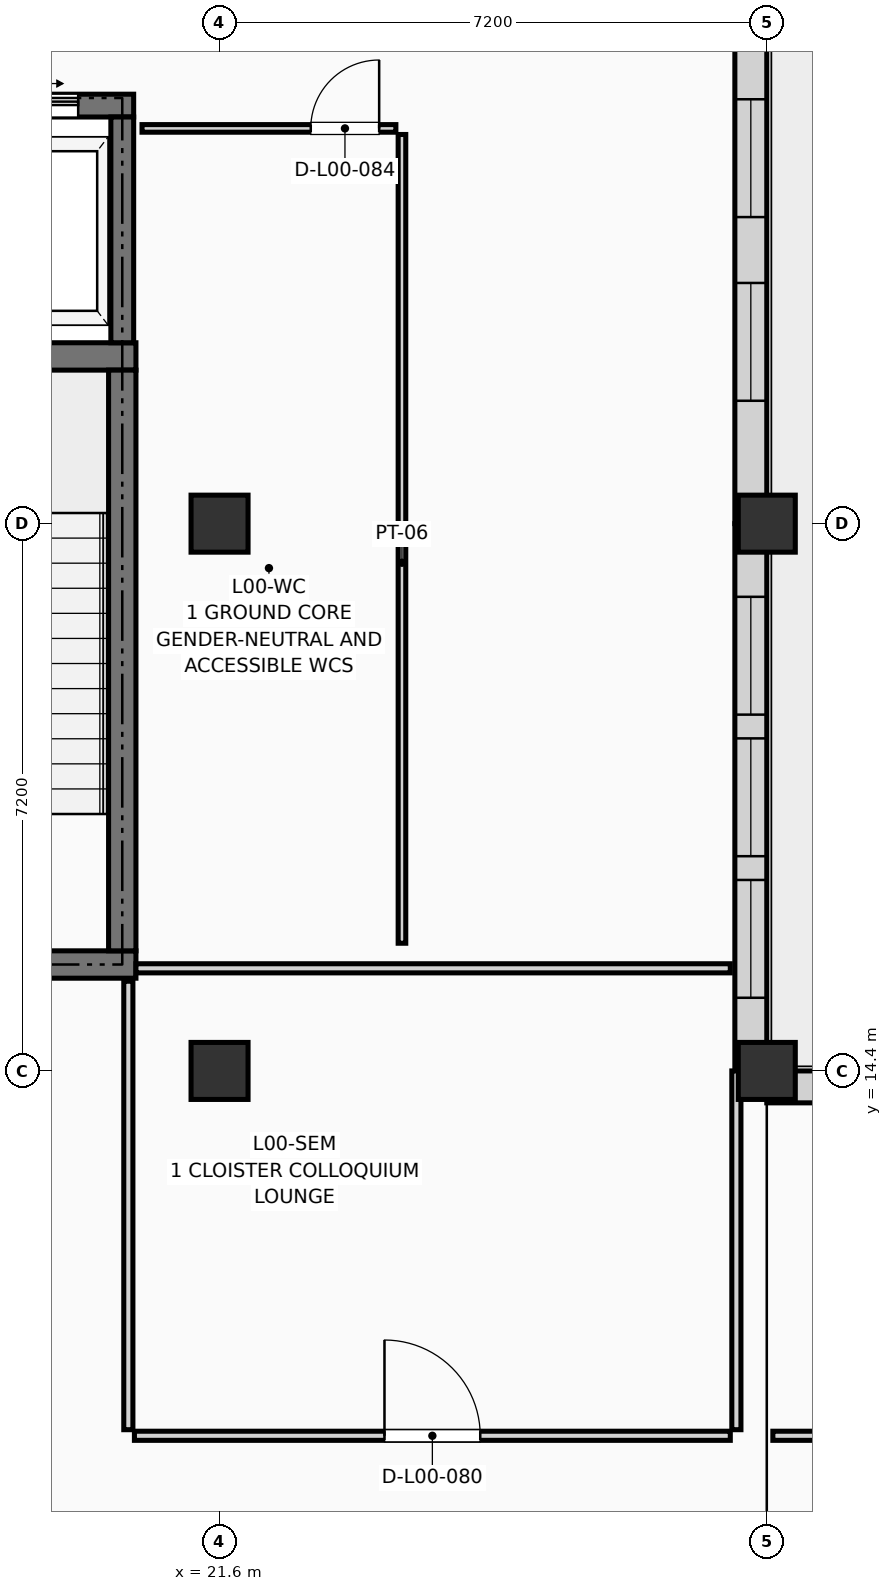
"""IFC4 building model, lengths in metres.
Left out: names, types, materials, properties, quantities, classifications, styles, units other than length and angle.
Written with IfcOpenShell. Run it as: python <this file> out.ifc"""

import sys

from ifc_helpers import new_model, si_unit, direction, frame, frame_2d, origin, origin_2d, place, context, subcontext, project, spatial, rectangle, extrude, element, fill, save


model = new_model("IFC4")
c1 = context("Model", 3, precision=1e-05, world=origin(), true_north=direction((0.0, 1.0)))
c2 = subcontext(c1, "Body", "Model", "MODEL_VIEW")
j1 = project(units=[si_unit("LENGTHUNIT", "METRE"), si_unit("PLANEANGLEUNIT", "RADIAN")], contexts=[c1])
p1 = place(None, origin())
s1 = spatial("IfcSite", under=j1, at=p1, CompositionType="ELEMENT")
p2 = place(p1, origin())
s2 = spatial("IfcBuilding", under=s1, at=p2, CompositionType="ELEMENT")
p3 = place(p2, origin())
s3 = spatial("IfcBuildingStorey", under=s2, at=p3, CompositionType="ELEMENT", Elevation=0.0)
for number, where, z_axis, x_axis in (
    (1, (21.6, 14.4, 0.0), (0.0, 0.0, 1.0), (1.0, 0.0, 0.0)),
    (2, (21.6, 21.6, 0.0), (0.0, 0.0, 1.0), (1.0, 0.0, 0.0)),
    (3, (28.8, 14.4, 0.0), (0.0, 0.0, 1.0), (1.0, 0.0, 0.0)),
    (4, (28.8, 21.6, 0.0), (0.0, 0.0, 1.0), (1.0, 0.0, 0.0)),
):
    element("IfcColumn", number, at=place(p3, frame(where, z_axis=z_axis, x_axis=x_axis)), inside=s3, PredefinedType="COLUMN", context=c2, shape_type="SweptSolid", body=[
        extrude(rectangle(XDim=0.75, YDim=0.75, at=origin_2d()), origin(), (0.0, 0.0, 1.0), 4.5),
    ])
p4 = place(p3, frame((28.59, 21.6, 0.0), z_axis=(0.0, 0.0, 1.0), x_axis=(0.0, 1.0, 0.0)))
e5 = element("IfcWall", 5, at=p4, inside=s3, PredefinedType="SOLIDWALL", context=c2, shape_type="SweptSolid", body=[
    extrude(rectangle(XDim=7.2, YDim=0.42, at=frame_2d((3.6, 0.0))), origin(), (0.0, 0.0, 1.0), 3.62),
])
p5 = place(p4, frame((1.617, 0.0, 0.45)))
e6 = element("IfcOpeningElement", 6, at=p5, cuts=e5, PredefinedType="OPENING", context=c2, shape_type="SweptSolid", body=[
    extrude(rectangle(XDim=1.55, YDim=2.55, at=frame_2d((0.775, 1.275))), frame((0.0, 0.222, 0.0), z_axis=(0.0, -1.0, 0.0), x_axis=(1.0, 0.0, 0.0)), (0.0, 0.0, 1.0), 0.444),
])
p6 = place(p4, frame((4.033, 0.0, 0.45)))
e7 = element("IfcOpeningElement", 7, at=p6, cuts=e5, PredefinedType="OPENING", context=c2, shape_type="SweptSolid", body=[
    extrude(rectangle(XDim=1.55, YDim=2.55, at=frame_2d((0.775, 1.275))), frame((0.0, 0.222, 0.0), z_axis=(0.0, -1.0, 0.0), x_axis=(1.0, 0.0, 0.0)), (0.0, 0.0, 1.0), 0.444),
])
p7 = place(p3, frame((28.59, 14.4, 0.0), z_axis=(0.0, 0.0, 1.0), x_axis=(0.0, 1.0, 0.0)))
e8 = element("IfcWall", 8, at=p7, inside=s3, PredefinedType="SOLIDWALL", context=c2, shape_type="SweptSolid", body=[
    extrude(rectangle(XDim=7.2, YDim=0.42, at=frame_2d((3.6, 0.0))), origin(), (0.0, 0.0, 1.0), 3.62),
])
p8 = place(p7, frame((0.962, 0.0, 0.18)))
e9 = element("IfcOpeningElement", 9, at=p8, cuts=e8, PredefinedType="OPENING", context=c2, shape_type="SweptSolid", body=[
    extrude(rectangle(XDim=1.55, YDim=3.25, at=frame_2d((0.775, 1.625))), frame((0.0, 0.222, 0.0), z_axis=(0.0, -1.0, 0.0), x_axis=(1.0, 0.0, 0.0)), (0.0, 0.0, 1.0), 0.444),
])
p9 = place(p7, frame((2.825, 0.0, 0.18)))
e10 = element("IfcOpeningElement", 10, at=p9, cuts=e8, PredefinedType="OPENING", context=c2, shape_type="SweptSolid", body=[
    extrude(rectangle(XDim=1.55, YDim=3.25, at=frame_2d((0.775, 1.625))), frame((0.0, 0.222, 0.0), z_axis=(0.0, -1.0, 0.0), x_axis=(1.0, 0.0, 0.0)), (0.0, 0.0, 1.0), 0.444),
])
p10 = place(p7, frame((4.688, 0.0, 0.18)))
e11 = element("IfcOpeningElement", 11, at=p10, cuts=e8, PredefinedType="OPENING", context=c2, shape_type="SweptSolid", body=[
    extrude(rectangle(XDim=1.55, YDim=3.25, at=frame_2d((0.775, 1.625))), frame((0.0, 0.222, 0.0), z_axis=(0.0, -1.0, 0.0), x_axis=(1.0, 0.0, 0.0)), (0.0, 0.0, 1.0), 0.444),
])
p11 = place(p3, frame((28.8, 14.19, 0.0), z_axis=(0.0, 0.0, 1.0), x_axis=(1.0, 0.0, 0.0)))
e12 = element("IfcWall", 12, at=p11, inside=s3, PredefinedType="SOLIDWALL", context=c2, shape_type="SweptSolid", body=[
    extrude(rectangle(XDim=7.2, YDim=0.42, at=frame_2d((3.6, 0.0))), origin(), (0.0, 0.0, 1.0), 3.62),
])
p12 = place(p11, frame((1.75, 0.0, 0.45)))
e13 = element("IfcOpeningElement", 13, at=p12, cuts=e12, PredefinedType="OPENING", context=c2, shape_type="SweptSolid", body=[
    extrude(rectangle(XDim=1.35, YDim=2.45, at=frame_2d((0.675, 1.225))), frame((0.0, 0.222, 0.0), z_axis=(0.0, -1.0, 0.0), x_axis=(1.0, 0.0, 0.0)), (0.0, 0.0, 1.0), 0.444),
])
p13 = place(p11, frame((4.1, 0.0, 0.45)))
e14 = element("IfcOpeningElement", 14, at=p13, cuts=e12, PredefinedType="OPENING", context=c2, shape_type="SweptSolid", body=[
    extrude(rectangle(XDim=1.35, YDim=2.45, at=frame_2d((0.675, 1.225))), frame((0.0, 0.222, 0.0), z_axis=(0.0, -1.0, 0.0), x_axis=(1.0, 0.0, 0.0)), (0.0, 0.0, 1.0), 0.444),
])
for number, where, z_axis, x_axis in (
    (15, (15.62, 15.8, 0.0), (0.0, 0.0, 1.0), (1.0, 0.0, 0.0)),
    (16, (15.62, 23.8, 0.0), (0.0, 0.0, 1.0), (1.0, 0.0, 0.0)),
):
    element("IfcWall", number, at=place(p3, frame(where, z_axis=z_axis, x_axis=x_axis)), inside=s3, PredefinedType="SHEAR", context=c2, shape_type="SweptSolid", body=[
        extrude(rectangle(XDim=4.88, YDim=0.36, at=frame_2d((2.44, 0.0))), origin(), (0.0, 0.0, 1.0), 4.25),
    ])
p14 = place(p3, frame((20.32, 15.98, 0.0), z_axis=(0.0, 0.0, 1.0), x_axis=(0.0, 1.0, 0.0)))
e17 = element("IfcWall", 17, at=p14, inside=s3, PredefinedType="SHEAR", context=c2, shape_type="SweptSolid", body=[
    extrude(rectangle(XDim=7.64, YDim=0.36, at=frame_2d((3.82, 0.0))), origin(), (0.0, 0.0, 1.0), 4.25),
])
p15 = place(p3, frame((17.91, 27.1, 0.0), z_axis=(0.0, 0.0, 1.0), x_axis=(1.0, 0.0, 0.0)))
e18 = element("IfcWall", 18, at=p15, inside=s3, PredefinedType="SHEAR", context=c2, shape_type="SweptSolid", body=[
    extrude(rectangle(XDim=2.56, YDim=0.3, at=frame_2d((1.28, 0.0))), origin(), (0.0, 0.0, 1.0), 4.25),
])
p16 = place(p15, frame((0.73, 0.0, 0.0)))
e19 = element("IfcOpeningElement", 19, at=p16, cuts=e18, PredefinedType="OPENING", context=c2, shape_type="SweptSolid", body=[
    extrude(rectangle(XDim=1.1, YDim=2.2, at=frame_2d((0.55, 1.1))), frame((0.0, 0.162, 0.0), z_axis=(0.0, -1.0, 0.0), x_axis=(1.0, 0.0, 0.0)), (0.0, 0.0, 1.0), 0.324),
])
p17 = place(p3, frame((20.32, 23.98, 0.0), z_axis=(0.0, 0.0, 1.0), x_axis=(0.0, 1.0, 0.0)))
e20 = element("IfcWall", 20, at=p17, inside=s3, PredefinedType="SHEAR", context=c2, shape_type="SweptSolid", body=[
    extrude(rectangle(XDim=2.97, YDim=0.3, at=frame_2d((1.485, 0.0))), origin(), (0.0, 0.0, 1.0), 4.25),
])
p18 = place(p3, frame((20.4, 9.68, 0.0), z_axis=(0.0, 0.0, 1.0), x_axis=(0.0, 1.0, 0.0)))
e21 = element("IfcWall", 21, at=p18, inside=s3, PredefinedType="PARTITIONING", context=c2, shape_type="SweptSolid", body=[
    extrude(rectangle(XDim=5.9, YDim=0.12, at=frame_2d((2.95, 0.0))), origin(), (0.0, 0.0, 1.0), 4.235),
])
p19 = place(p3, frame((20.48, 9.6, 0.0), z_axis=(0.0, 0.0, 1.0), x_axis=(1.0, 0.0, 0.0)))
e22 = element("IfcWall", 22, at=p19, inside=s3, PredefinedType="PARTITIONING", context=c2, shape_type="SweptSolid", body=[
    extrude(rectangle(XDim=7.84, YDim=0.12, at=frame_2d((3.92, 0.0))), origin(), (0.0, 0.0, 1.0), 4.235),
])
p20 = place(p19, frame((3.29, 0.0, 0.0)))
e23 = element("IfcOpeningElement", 23, at=p20, cuts=e22, PredefinedType="OPENING", context=c2, shape_type="SweptSolid", body=[
    extrude(rectangle(XDim=1.26, YDim=2.18, at=frame_2d((0.63, 1.09))), frame((0.0, 0.072, 0.0), z_axis=(0.0, -1.0, 0.0), x_axis=(1.0, 0.0, 0.0)), (0.0, 0.0, 1.0), 0.144),
])
p21 = place(p3, frame((28.4, 9.68, 0.0), z_axis=(0.0, 0.0, 1.0), x_axis=(0.0, 1.0, 0.0)))
e24 = element("IfcWall", 24, at=p21, inside=s3, PredefinedType="PARTITIONING", context=c2, shape_type="SweptSolid", body=[
    extrude(rectangle(XDim=4.72, YDim=0.12, at=frame_2d((2.36, 0.0))), origin(), (0.0, 0.0, 1.0), 3.385),
])
p22 = place(p3, frame((20.5, 15.75, 0.0), z_axis=(0.0, 0.0, 1.0), x_axis=(1.0, 0.0, 0.0)))
e25 = element("IfcWall", 25, at=p22, inside=s3, PredefinedType="PARTITIONING", context=c2, shape_type="SweptSolid", body=[
    extrude(rectangle(XDim=7.82, YDim=0.12, at=frame_2d((3.91, 0.0))), origin(), (0.0, 0.0, 1.0), 4.235),
])
p23 = place(p3, frame((24.0, 16.08, 0.0), z_axis=(0.0, 0.0, 1.0), x_axis=(0.0, 1.0, 0.0)))
e26 = element("IfcWall", 26, at=p23, inside=s3, PredefinedType="PARTITIONING", context=c2, shape_type="SweptSolid", body=[
    extrude(rectangle(XDim=10.64, YDim=0.1, at=frame_2d((5.32, 0.0))), origin(), (0.0, 0.0, 1.0), 4.235),
])
p24 = place(p3, frame((20.58, 26.8, 0.0), z_axis=(0.0, 0.0, 1.0), x_axis=(1.0, 0.0, 0.0)))
e27 = element("IfcWall", 27, at=p24, inside=s3, PredefinedType="PARTITIONING", context=c2, shape_type="SweptSolid", body=[
    extrude(rectangle(XDim=3.34, YDim=0.1, at=frame_2d((1.67, 0.0))), origin(), (0.0, 0.0, 1.0), 4.235),
])
p25 = place(p24, frame((2.22, 0.0, 0.0)))
e28 = element("IfcOpeningElement", 28, at=p25, cuts=e27, PredefinedType="OPENING", context=c2, shape_type="SweptSolid", body=[
    extrude(rectangle(XDim=0.9, YDim=2.1, at=frame_2d((0.45, 1.05))), frame((0.0, 0.062, 0.0), z_axis=(0.0, -1.0, 0.0), x_axis=(1.0, 0.0, 0.0)), (0.0, 0.0, 1.0), 0.124),
])
p26 = place(p3, frame((28.88, 9.6, 0.0), z_axis=(0.0, 0.0, 1.0), x_axis=(1.0, 0.0, 0.0)))
e29 = element("IfcWall", 29, at=p26, inside=s3, PredefinedType="PARTITIONING", context=c2, shape_type="SweptSolid", body=[
    extrude(rectangle(XDim=21.44, YDim=0.12, at=frame_2d((10.72, 0.0))), origin(), (0.0, 0.0, 1.0), 4.235),
])
p27 = place(p26, frame((9.87, 0.0, 0.0)))
e30 = element("IfcOpeningElement", 30, at=p27, cuts=e29, PredefinedType="OPENING", context=c2, shape_type="SweptSolid", body=[
    extrude(rectangle(XDim=1.7, YDim=2.28, at=frame_2d((0.85, 1.14))), frame((0.0, 0.072, 0.0), z_axis=(0.0, -1.0, 0.0), x_axis=(1.0, 0.0, 0.0)), (0.0, 0.0, 1.0), 0.144),
])
p28 = place(p5, origin())
e31 = element("IfcWindow", 31, at=p28, inside=s3, PartitioningType="SINGLE_PANEL", PredefinedType="WINDOW", context=c2, shape_type="SweptSolid", body=[
    extrude(rectangle(XDim=1.55, YDim=2.55, at=frame_2d((0.775, 1.275))), frame((0.0, 0.03, 0.0), z_axis=(0.0, -1.0, 0.0), x_axis=(1.0, 0.0, 0.0)), (0.0, 0.0, 1.0), 0.06),
])
fill(e6, e31)
p29 = place(p6, origin())
e32 = element("IfcWindow", 32, at=p29, inside=s3, PartitioningType="SINGLE_PANEL", PredefinedType="WINDOW", context=c2, shape_type="SweptSolid", body=[
    extrude(rectangle(XDim=1.55, YDim=2.55, at=frame_2d((0.775, 1.275))), frame((0.0, 0.03, 0.0), z_axis=(0.0, -1.0, 0.0), x_axis=(1.0, 0.0, 0.0)), (0.0, 0.0, 1.0), 0.06),
])
fill(e7, e32)
p30 = place(p8, origin())
e33 = element("IfcWindow", 33, at=p30, inside=s3, PartitioningType="SINGLE_PANEL", PredefinedType="WINDOW", context=c2, shape_type="SweptSolid", body=[
    extrude(rectangle(XDim=1.55, YDim=3.25, at=frame_2d((0.775, 1.625))), frame((0.0, 0.03, 0.0), z_axis=(0.0, -1.0, 0.0), x_axis=(1.0, 0.0, 0.0)), (0.0, 0.0, 1.0), 0.06),
])
fill(e9, e33)
p31 = place(p9, origin())
e34 = element("IfcWindow", 34, at=p31, inside=s3, PartitioningType="SINGLE_PANEL", PredefinedType="WINDOW", context=c2, shape_type="SweptSolid", body=[
    extrude(rectangle(XDim=1.55, YDim=3.25, at=frame_2d((0.775, 1.625))), frame((0.0, 0.03, 0.0), z_axis=(0.0, -1.0, 0.0), x_axis=(1.0, 0.0, 0.0)), (0.0, 0.0, 1.0), 0.06),
])
fill(e10, e34)
p32 = place(p10, origin())
e35 = element("IfcWindow", 35, at=p32, inside=s3, PartitioningType="SINGLE_PANEL", PredefinedType="WINDOW", context=c2, shape_type="SweptSolid", body=[
    extrude(rectangle(XDim=1.55, YDim=3.25, at=frame_2d((0.775, 1.625))), frame((0.0, 0.03, 0.0), z_axis=(0.0, -1.0, 0.0), x_axis=(1.0, 0.0, 0.0)), (0.0, 0.0, 1.0), 0.06),
])
fill(e11, e35)
p33 = place(p16, origin())
e36 = element("IfcDoor", 36, at=p33, inside=s3, OperationType="DOUBLE_DOOR_SLIDING", PredefinedType="DOOR", context=c2, shape_type="SweptSolid", body=[
    extrude(rectangle(XDim=1.1, YDim=2.2, at=frame_2d((0.55, 1.1))), frame((0.0, 0.025, 0.0), z_axis=(0.0, -1.0, 0.0), x_axis=(1.0, 0.0, 0.0)), (0.0, 0.0, 1.0), 0.05),
])
fill(e19, e36)
p34 = place(p20, origin())
e37 = element("IfcDoor", 37, at=p34, inside=s3, OperationType="SINGLE_SWING_LEFT", PredefinedType="DOOR", context=c2, shape_type="SweptSolid", body=[
    extrude(rectangle(XDim=1.26, YDim=2.18, at=frame_2d((0.63, 1.09))), frame((0.0, 0.025, 0.0), z_axis=(0.0, -1.0, 0.0), x_axis=(1.0, 0.0, 0.0)), (0.0, 0.0, 1.0), 0.05),
])
fill(e23, e37)
p35 = place(p25, origin())
e38 = element("IfcDoor", 38, at=p35, inside=s3, OperationType="SINGLE_SWING_RIGHT", PredefinedType="DOOR", context=c2, shape_type="SweptSolid", body=[
    extrude(rectangle(XDim=0.9, YDim=2.1, at=frame_2d((0.45, 1.05))), frame((0.0, 0.025, 0.0), z_axis=(0.0, -1.0, 0.0), x_axis=(1.0, 0.0, 0.0)), (0.0, 0.0, 1.0), 0.05),
])
fill(e28, e38)
save(model, sys.argv[1])
